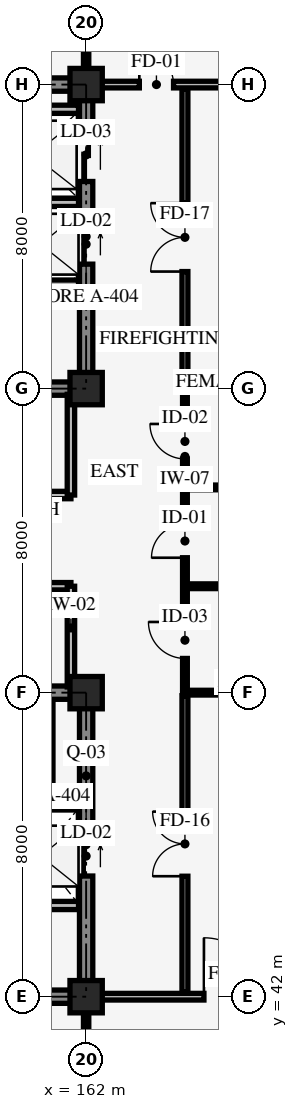
"""IFC4 building model, lengths in metres.
Left out: names, types, materials, properties, quantities, classifications, styles, units other than length and angle.
Written with IfcOpenShell. Run it as: python <this file> out.ifc"""

import sys

from ifc_helpers import new_model, si_unit, direction, frame, frame_2d, origin, origin_2d, place, context, subcontext, project, spatial, rectangle, extrude, element, fill, save


model = new_model("IFC4")
c1 = context("Model", 3, precision=1e-05, world=origin(), true_north=direction((0.0, 1.0)))
c2 = subcontext(c1, "Body", "Model", "MODEL_VIEW")
j1 = project(units=[si_unit("LENGTHUNIT", "METRE"), si_unit("PLANEANGLEUNIT", "RADIAN")], contexts=[c1])
p1 = place(None, origin())
s1 = spatial("IfcSite", under=j1, at=p1, CompositionType="ELEMENT")
p2 = place(p1, origin())
s2 = spatial("IfcBuilding", under=s1, at=p2, CompositionType="ELEMENT")
p3 = place(p2, frame((0.0, 0.0, 27.6)))
s3 = spatial("IfcBuildingStorey", under=s2, at=p3, CompositionType="ELEMENT", Elevation=27.6)
p4 = place(p3, frame((154.0, 42.0, 0.0), z_axis=(0.0, 0.0, 1.0), x_axis=(1.0, 0.0, 0.0)))
e1 = element("IfcWall", 1, at=p4, inside=s3, PredefinedType="SHEAR", context=c2, shape_type="SweptSolid", body=[
    extrude(rectangle(XDim=8.0, YDim=0.35, at=frame_2d((4.0, 0.0))), origin(), (0.0, 0.0, 1.0), 3.95),
])
p5 = place(p3, frame((162.0, 42.0, 0.0), z_axis=(0.0, 0.0, 1.0), x_axis=(0.0, 1.0, 0.0)))
e2 = element("IfcWall", 2, at=p5, inside=s3, PredefinedType="SHEAR", context=c2, shape_type="SweptSolid", body=[
    extrude(rectangle(XDim=8.0, YDim=0.35, at=frame_2d((4.0, 0.0))), origin(), (0.0, 0.0, 1.0), 3.95),
])
p6 = place(p5, frame((3.175, 0.0, 0.0)))
e3 = element("IfcOpeningElement", 3, at=p6, cuts=e2, PredefinedType="OPENING", context=c2, shape_type="SweptSolid", body=[
    extrude(rectangle(XDim=1.05, YDim=2.2, at=frame_2d((0.525, 1.1))), frame((0.0, 0.185, 0.0), z_axis=(0.0, -1.0, 0.0), x_axis=(1.0, 0.0, 0.0)), (0.0, 0.0, 1.0), 0.37),
])
p7 = place(p3, frame((162.0, 50.0, 0.0), z_axis=(0.0, 0.0, 1.0), x_axis=(-1.0, 0.0, 0.0)))
e4 = element("IfcWall", 4, at=p7, inside=s3, PredefinedType="SHEAR", context=c2, shape_type="SweptSolid", body=[
    extrude(rectangle(XDim=8.0, YDim=0.35, at=frame_2d((4.0, 0.0))), origin(), (0.0, 0.0, 1.0), 3.95),
])
p8 = place(p7, frame((5.3, 0.0, 0.0)))
e5 = element("IfcOpeningElement", 5, at=p8, cuts=e4, PredefinedType="OPENING", context=c2, shape_type="SweptSolid", body=[
    extrude(rectangle(XDim=1.3, YDim=2.15, at=frame_2d((0.65, 1.075))), frame((0.0, 0.185, 0.0), z_axis=(0.0, -1.0, 0.0), x_axis=(1.0, 0.0, 0.0)), (0.0, 0.0, 1.0), 0.37),
])
p9 = place(p7, frame((1.45, 0.0, 0.0)))
e6 = element("IfcOpeningElement", 6, at=p9, cuts=e4, PredefinedType="OPENING", context=c2, shape_type="SweptSolid", body=[
    extrude(rectangle(XDim=1.1, YDim=2.2, at=frame_2d((0.55, 1.1))), frame((0.0, 0.185, 0.0), z_axis=(0.0, -1.0, 0.0), x_axis=(1.0, 0.0, 0.0)), (0.0, 0.0, 1.0), 0.37),
])
p10 = place(p3, frame((154.0, 58.0, 0.0), z_axis=(0.0, 0.0, 1.0), x_axis=(1.0, 0.0, 0.0)))
e7 = element("IfcWall", 7, at=p10, inside=s3, PredefinedType="SHEAR", context=c2, shape_type="SweptSolid", body=[
    extrude(rectangle(XDim=8.0, YDim=0.35, at=frame_2d((4.0, 0.0))), origin(), (0.0, 0.0, 1.0), 3.95),
])
p11 = place(p10, frame((1.4, 0.0, 0.0)))
e8 = element("IfcOpeningElement", 8, at=p11, cuts=e7, PredefinedType="OPENING", context=c2, shape_type="SweptSolid", body=[
    extrude(rectangle(XDim=1.3, YDim=2.15, at=frame_2d((0.65, 1.075))), frame((0.0, 0.185, 0.0), z_axis=(0.0, -1.0, 0.0), x_axis=(1.0, 0.0, 0.0)), (0.0, 0.0, 1.0), 0.37),
])
p12 = place(p10, frame((5.3, 0.0, 0.0)))
e9 = element("IfcOpeningElement", 9, at=p12, cuts=e7, PredefinedType="OPENING", context=c2, shape_type="SweptSolid", body=[
    extrude(rectangle(XDim=1.1, YDim=2.2, at=frame_2d((0.55, 1.1))), frame((0.0, 0.185, 0.0), z_axis=(0.0, -1.0, 0.0), x_axis=(1.0, 0.0, 0.0)), (0.0, 0.0, 1.0), 0.37),
])
p13 = place(p3, frame((162.0, 58.0, 0.0), z_axis=(0.0, 0.0, 1.0), x_axis=(0.0, 1.0, 0.0)))
e10 = element("IfcWall", 10, at=p13, inside=s3, PredefinedType="SHEAR", context=c2, shape_type="SweptSolid", body=[
    extrude(rectangle(XDim=8.0, YDim=0.35, at=frame_2d((4.0, 0.0))), origin(), (0.0, 0.0, 1.0), 3.95),
])
p14 = place(p13, frame((3.275, 0.0, 0.0)))
e11 = element("IfcOpeningElement", 11, at=p14, cuts=e10, PredefinedType="OPENING", context=c2, shape_type="SweptSolid", body=[
    extrude(rectangle(XDim=1.05, YDim=2.2, at=frame_2d((0.525, 1.1))), frame((0.0, 0.185, 0.0), z_axis=(0.0, -1.0, 0.0), x_axis=(1.0, 0.0, 0.0)), (0.0, 0.0, 1.0), 0.37),
])
p15 = place(p13, frame((5.45, 0.0, 0.0)))
e12 = element("IfcOpeningElement", 12, at=p15, cuts=e10, PredefinedType="OPENING", context=c2, shape_type="SweptSolid", body=[
    extrude(rectangle(XDim=1.4, YDim=2.3, at=frame_2d((0.7, 1.15))), frame((0.0, 0.185, 0.0), z_axis=(0.0, -1.0, 0.0), x_axis=(1.0, 0.0, 0.0)), (0.0, 0.0, 1.0), 0.37),
])
p16 = place(p3, frame((162.0, 66.0, 0.0), z_axis=(0.0, 0.0, 1.0), x_axis=(-1.0, 0.0, 0.0)))
e13 = element("IfcWall", 13, at=p16, inside=s3, PredefinedType="SHEAR", context=c2, shape_type="SweptSolid", body=[
    extrude(rectangle(XDim=8.0, YDim=0.35, at=frame_2d((4.0, 0.0))), origin(), (0.0, 0.0, 1.0), 3.95),
])
for number, where, z_axis, x_axis in (
    (14, (162.0, 42.0, 0.0), (0.0, 0.0, 1.0), (1.0, 0.0, 0.0)),
    (15, (162.0, 50.0, 0.0), (0.0, 0.0, 1.0), (1.0, 0.0, 0.0)),
    (16, (162.0, 58.0, 0.0), (0.0, 0.0, 1.0), (1.0, 0.0, 0.0)),
    (17, (162.0, 66.0, 0.0), (0.0, 0.0, 1.0), (1.0, 0.0, 0.0)),
):
    element("IfcColumn", number, at=place(p3, frame(where, z_axis=z_axis, x_axis=x_axis)), inside=s3, PredefinedType="COLUMN", context=c2, shape_type="SweptSolid", body=[
        extrude(rectangle(XDim=0.85, YDim=0.85, at=origin_2d()), origin(), (0.0, 0.0, 1.0), 4.2),
    ])
p17 = place(p3, frame((158.45, 47.02, 0.0), z_axis=(0.0, 0.0, 1.0), x_axis=(1.0, 0.0, 0.0)))
e18 = element("IfcWall", 18, at=p17, inside=s3, PredefinedType="STANDARD", context=c2, shape_type="SweptSolid", body=[
    extrude(rectangle(XDim=3.35, YDim=0.215, at=frame_2d((1.675, 0.0))), origin(), (0.0, 0.0, 1.0), 3.9),
])
p18 = place(p3, frame((161.02, 47.02, 0.0), z_axis=(0.0, 0.0, 1.0), x_axis=(0.0, 1.0, 0.0)))
e19 = element("IfcWall", 19, at=p18, inside=s3, PredefinedType="STANDARD", context=c2, shape_type="SweptSolid", body=[
    extrude(rectangle(XDim=2.78, YDim=0.215, at=frame_2d((1.39, 0.0))), origin(), (0.0, 0.0, 1.0), 3.9),
])
p19 = place(p3, frame((159.78, 44.4, 0.0), z_axis=(0.0, 0.0, 1.0), x_axis=(1.0, 0.0, 0.0)))
e20 = element("IfcWall", 20, at=p19, inside=s3, PredefinedType="STANDARD", context=c2, shape_type="SweptSolid", body=[
    extrude(rectangle(XDim=2.02, YDim=0.215, at=frame_2d((1.01, 0.0))), origin(), (0.0, 0.0, 1.0), 3.9),
])
p20 = place(p3, frame((158.45, 62.9, 0.0), z_axis=(0.0, 0.0, 1.0), x_axis=(1.0, 0.0, 0.0)))
e21 = element("IfcWall", 21, at=p20, inside=s3, PredefinedType="STANDARD", context=c2, shape_type="SweptSolid", body=[
    extrude(rectangle(XDim=3.35, YDim=0.215, at=frame_2d((1.675, 0.0))), origin(), (0.0, 0.0, 1.0), 3.9),
])
p21 = place(p3, frame((159.38, 65.35, 0.0), z_axis=(0.0, 0.0, 1.0), x_axis=(1.0, 0.0, 0.0)))
e22 = element("IfcWall", 22, at=p21, inside=s3, PredefinedType="STANDARD", context=c2, shape_type="SweptSolid", body=[
    extrude(rectangle(XDim=2.42, YDim=0.215, at=frame_2d((1.21, 0.0))), origin(), (0.0, 0.0, 1.0), 3.9),
])
p22 = place(p3, frame((158.45, 60.75, 0.0), z_axis=(0.0, 0.0, 1.0), x_axis=(1.0, 0.0, 0.0)))
e23 = element("IfcWall", 23, at=p22, inside=s3, PredefinedType="STANDARD", context=c2, shape_type="SweptSolid", body=[
    extrude(rectangle(XDim=3.35, YDim=0.215, at=frame_2d((1.675, 0.0))), origin(), (0.0, 0.0, 1.0), 3.9),
])
p23 = place(p3, frame((154.0, 52.8, 0.0), z_axis=(0.0, 0.0, 1.0), x_axis=(1.0, 0.0, 0.0)))
e24 = element("IfcWall", 24, at=p23, inside=s3, PredefinedType="STANDARD", context=c2, shape_type="SweptSolid", body=[
    extrude(rectangle(XDim=7.6, YDim=0.195, at=frame_2d((3.8, 0.0))), origin(), (0.0, 0.0, 1.0), 3.9),
])
p24 = place(p23, frame((2.8, 0.0, 0.0)))
e25 = element("IfcOpeningElement", 25, at=p24, cuts=e24, PredefinedType="OPENING", context=c2, shape_type="SweptSolid", body=[
    extrude(rectangle(XDim=1.25, YDim=2.15, at=frame_2d((0.625, 1.075))), frame((0.0, 0.107, 0.0), z_axis=(0.0, -1.0, 0.0), x_axis=(1.0, 0.0, 0.0)), (0.0, 0.0, 1.0), 0.215),
])
p25 = place(p3, frame((161.6, 50.15, 0.0), z_axis=(0.0, 0.0, 1.0), x_axis=(0.0, 1.0, 0.0)))
e26 = element("IfcWall", 26, at=p25, inside=s3, PredefinedType="STANDARD", context=c2, shape_type="SweptSolid", body=[
    extrude(rectangle(XDim=2.65, YDim=0.195, at=frame_2d((1.325, 0.0))), origin(), (0.0, 0.0, 1.0), 3.29),
])
p26 = place(p3, frame((154.0, 55.2, 0.0), z_axis=(0.0, 0.0, 1.0), x_axis=(1.0, 0.0, 0.0)))
e27 = element("IfcWall", 27, at=p26, inside=s3, PredefinedType="STANDARD", context=c2, shape_type="SweptSolid", body=[
    extrude(rectangle(XDim=7.6, YDim=0.195, at=frame_2d((3.8, 0.0))), origin(), (0.0, 0.0, 1.0), 3.9),
])
p27 = place(p26, frame((2.8, 0.0, 0.0)))
e28 = element("IfcOpeningElement", 28, at=p27, cuts=e27, PredefinedType="OPENING", context=c2, shape_type="SweptSolid", body=[
    extrude(rectangle(XDim=1.35, YDim=2.15, at=frame_2d((0.675, 1.075))), frame((0.0, 0.107, 0.0), z_axis=(0.0, -1.0, 0.0), x_axis=(1.0, 0.0, 0.0)), (0.0, 0.0, 1.0), 0.215),
])
p28 = place(p3, frame((161.6, 55.2, 0.0), z_axis=(0.0, 0.0, 1.0), x_axis=(0.0, 1.0, 0.0)))
e29 = element("IfcWall", 29, at=p28, inside=s3, PredefinedType="STANDARD", context=c2, shape_type="SweptSolid", body=[
    extrude(rectangle(XDim=2.65, YDim=0.195, at=frame_2d((1.325, 0.0))), origin(), (0.0, 0.0, 1.0), 3.29),
])
p29 = place(p3, frame((164.6, 50.0, 0.0), z_axis=(0.0, 0.0, 1.0), x_axis=(0.0, 1.0, 0.0)))
e30 = element("IfcWall", 30, at=p29, inside=s3, PredefinedType="STANDARD", context=c2, shape_type="SweptSolid", body=[
    extrude(rectangle(XDim=8.0, YDim=0.125, at=frame_2d((4.0, 0.0))), origin(), (0.0, 0.0, 1.0), 3.9),
])
p30 = place(p29, frame((0.9, 0.0, 0.0)))
e31 = element("IfcOpeningElement", 31, at=p30, cuts=e30, PredefinedType="OPENING", context=c2, shape_type="SweptSolid", body=[
    extrude(rectangle(XDim=0.96, YDim=2.08, at=frame_2d((0.48, 1.04))), frame((0.0, 0.073, 0.0), z_axis=(0.0, -1.0, 0.0), x_axis=(1.0, 0.0, 0.0)), (0.0, 0.0, 1.0), 0.145),
])
p31 = place(p29, frame((3.55, 0.0, 0.0)))
e32 = element("IfcOpeningElement", 32, at=p31, cuts=e30, PredefinedType="OPENING", context=c2, shape_type="SweptSolid", body=[
    extrude(rectangle(XDim=0.88, YDim=2.05, at=frame_2d((0.44, 1.025))), frame((0.0, 0.073, 0.0), z_axis=(0.0, -1.0, 0.0), x_axis=(1.0, 0.0, 0.0)), (0.0, 0.0, 1.0), 0.145),
])
p32 = place(p29, frame((6.15, 0.0, 0.0)))
e33 = element("IfcOpeningElement", 33, at=p32, cuts=e30, PredefinedType="OPENING", context=c2, shape_type="SweptSolid", body=[
    extrude(rectangle(XDim=0.92, YDim=2.05, at=frame_2d((0.46, 1.025))), frame((0.0, 0.073, 0.0), z_axis=(0.0, -1.0, 0.0), x_axis=(1.0, 0.0, 0.0)), (0.0, 0.0, 1.0), 0.145),
])
p33 = place(p3, frame((164.6, 50.0, 0.0), z_axis=(0.0, 0.0, 1.0), x_axis=(1.0, 0.0, 0.0)))
e34 = element("IfcWall", 34, at=p33, inside=s3, PredefinedType="STANDARD", context=c2, shape_type="SweptSolid", body=[
    extrude(rectangle(XDim=3.8, YDim=0.125, at=frame_2d((1.9, 0.0))), origin(), (0.0, 0.0, 1.0), 3.24),
])
for number, where, z_axis, x_axis in (
    (35, (164.6, 52.8, 0.0), (0.0, 0.0, 1.0), (1.0, 0.0, 0.0)),
    (36, (164.6, 55.4, 0.0), (0.0, 0.0, 1.0), (1.0, 0.0, 0.0)),
):
    element("IfcWall", number, at=place(p3, frame(where, z_axis=z_axis, x_axis=x_axis)), inside=s3, PredefinedType="STANDARD", context=c2, shape_type="SweptSolid", body=[
        extrude(rectangle(XDim=3.8, YDim=0.125, at=frame_2d((1.9, 0.0))), origin(), (0.0, 0.0, 1.0), 3.9),
    ])
p34 = place(p3, frame((164.6, 58.0, 0.0), z_axis=(0.0, 0.0, 1.0), x_axis=(1.0, 0.0, 0.0)))
e37 = element("IfcWall", 37, at=p34, inside=s3, PredefinedType="STANDARD", context=c2, shape_type="SweptSolid", body=[
    extrude(rectangle(XDim=3.8, YDim=0.125, at=frame_2d((1.9, 0.0))), origin(), (0.0, 0.0, 1.0), 3.24),
])
p35 = place(p3, frame((164.6, 42.12, 0.0), z_axis=(0.0, 0.0, 1.0), x_axis=(0.0, 1.0, 0.0)))
e38 = element("IfcWall", 38, at=p35, inside=s3, PredefinedType="STANDARD", context=c2, shape_type="SweptSolid", body=[
    extrude(rectangle(XDim=7.8, YDim=0.155, at=frame_2d((3.9, 0.0))), origin(), (0.0, 0.0, 1.0), 3.9),
])
p36 = place(p35, frame((3.05, 0.0, 0.0)))
e39 = element("IfcOpeningElement", 39, at=p36, cuts=e38, PredefinedType="OPENING", context=c2, shape_type="SweptSolid", body=[
    extrude(rectangle(XDim=1.7, YDim=2.3, at=frame_2d((0.85, 1.15))), frame((0.0, 0.087, 0.0), z_axis=(0.0, -1.0, 0.0), x_axis=(1.0, 0.0, 0.0)), (0.0, 0.0, 1.0), 0.175),
])
p37 = place(p3, frame((164.6, 58.08, 0.0), z_axis=(0.0, 0.0, 1.0), x_axis=(0.0, 1.0, 0.0)))
e40 = element("IfcWall", 40, at=p37, inside=s3, PredefinedType="STANDARD", context=c2, shape_type="SweptSolid", body=[
    extrude(rectangle(XDim=7.8, YDim=0.155, at=frame_2d((3.9, 0.0))), origin(), (0.0, 0.0, 1.0), 3.9),
])
p38 = place(p37, frame((3.0, 0.0, 0.0)))
e41 = element("IfcOpeningElement", 41, at=p38, cuts=e40, PredefinedType="OPENING", context=c2, shape_type="SweptSolid", body=[
    extrude(rectangle(XDim=1.8, YDim=2.3, at=frame_2d((0.9, 1.15))), frame((0.0, 0.087, 0.0), z_axis=(0.0, -1.0, 0.0), x_axis=(1.0, 0.0, 0.0)), (0.0, 0.0, 1.0), 0.175),
])
p39 = place(p3, frame((162.0, 34.05, 0.0), z_axis=(0.0, 0.0, 1.0), x_axis=(0.0, 1.0, 0.0)))
e42 = element("IfcWall", 42, at=p39, inside=s3, PredefinedType="STANDARD", context=c2, shape_type="SweptSolid", body=[
    extrude(rectangle(XDim=7.83, YDim=0.14, at=frame_2d((3.915, 0.0))), origin(), (0.0, 0.0, 1.0), 3.29),
])
p40 = place(p39, frame((3.0, 0.0, 0.0)))
e43 = element("IfcOpeningElement", 43, at=p40, cuts=e42, PredefinedType="OPENING", context=c2, shape_type="SweptSolid", body=[
    extrude(rectangle(XDim=1.06, YDim=2.12, at=frame_2d((0.53, 1.06))), frame((0.0, 0.08, 0.0), z_axis=(0.0, -1.0, 0.0), x_axis=(1.0, 0.0, 0.0)), (0.0, 0.0, 1.0), 0.16),
])
p41 = place(p3, frame((162.35, 42.0, 0.0), z_axis=(0.0, 0.0, 1.0), x_axis=(1.0, 0.0, 0.0)))
e44 = element("IfcWall", 44, at=p41, inside=s3, PredefinedType="STANDARD", context=c2, shape_type="SweptSolid", body=[
    extrude(rectangle(XDim=14.7, YDim=0.175, at=frame_2d((7.35, 0.0))), origin(), (0.0, 0.0, 1.0), 3.24),
])
p42 = place(p41, frame((2.75, 0.0, 0.0)))
e45 = element("IfcOpeningElement", 45, at=p42, cuts=e44, PredefinedType="OPENING", context=c2, shape_type="SweptSolid", body=[
    extrude(rectangle(XDim=1.55, YDim=2.25, at=frame_2d((0.775, 1.125))), frame((0.0, 0.098, 0.0), z_axis=(0.0, -1.0, 0.0), x_axis=(1.0, 0.0, 0.0)), (0.0, 0.0, 1.0), 0.195),
])
p43 = place(p3, frame((162.0, 66.12, 0.0), z_axis=(0.0, 0.0, 1.0), x_axis=(0.0, 1.0, 0.0)))
e46 = element("IfcWall", 46, at=p43, inside=s3, PredefinedType="STANDARD", context=c2, shape_type="SweptSolid", body=[
    extrude(rectangle(XDim=7.83, YDim=0.14, at=frame_2d((3.915, 0.0))), origin(), (0.0, 0.0, 1.0), 3.29),
])
p44 = place(p43, frame((3.0, 0.0, 0.0)))
e47 = element("IfcOpeningElement", 47, at=p44, cuts=e46, PredefinedType="OPENING", context=c2, shape_type="SweptSolid", body=[
    extrude(rectangle(XDim=1.12, YDim=2.12, at=frame_2d((0.56, 1.06))), frame((0.0, 0.08, 0.0), z_axis=(0.0, -1.0, 0.0), x_axis=(1.0, 0.0, 0.0)), (0.0, 0.0, 1.0), 0.16),
])
p45 = place(p3, frame((162.35, 66.0, 0.0), z_axis=(0.0, 0.0, 1.0), x_axis=(1.0, 0.0, 0.0)))
e48 = element("IfcWall", 48, at=p45, inside=s3, PredefinedType="STANDARD", context=c2, shape_type="SweptSolid", body=[
    extrude(rectangle(XDim=14.7, YDim=0.175, at=frame_2d((7.35, 0.0))), origin(), (0.0, 0.0, 1.0), 3.24),
])
p46 = place(p45, frame((1.05, 0.0, 0.0)))
e49 = element("IfcOpeningElement", 49, at=p46, cuts=e48, PredefinedType="OPENING", context=c2, shape_type="SweptSolid", body=[
    extrude(rectangle(XDim=0.9, YDim=2.1, at=frame_2d((0.45, 1.05))), frame((0.0, 0.098, 0.0), z_axis=(0.0, -1.0, 0.0), x_axis=(1.0, 0.0, 0.0)), (0.0, 0.0, 1.0), 0.195),
])
p47 = place(p6, origin())
e50 = element("IfcDoor", 50, at=p47, inside=s3, OperationType="SLIDING_TO_LEFT", PredefinedType="DOOR", context=c2, shape_type="SweptSolid", body=[
    extrude(rectangle(XDim=1.05, YDim=2.2, at=frame_2d((0.525, 1.1))), frame((0.0, 0.025, 0.0), z_axis=(0.0, -1.0, 0.0), x_axis=(1.0, 0.0, 0.0)), (0.0, 0.0, 1.0), 0.05),
])
fill(e3, e50)
p48 = place(p14, origin())
e51 = element("IfcDoor", 51, at=p48, inside=s3, OperationType="SLIDING_TO_RIGHT", PredefinedType="DOOR", context=c2, shape_type="SweptSolid", body=[
    extrude(rectangle(XDim=1.05, YDim=2.2, at=frame_2d((0.525, 1.1))), frame((0.0, 0.025, 0.0), z_axis=(0.0, -1.0, 0.0), x_axis=(1.0, 0.0, 0.0)), (0.0, 0.0, 1.0), 0.05),
])
fill(e11, e51)
p49 = place(p15, origin())
e52 = element("IfcDoor", 52, at=p49, inside=s3, OperationType="DOUBLE_DOOR_SLIDING", PredefinedType="DOOR", context=c2, shape_type="SweptSolid", body=[
    extrude(rectangle(XDim=1.4, YDim=2.3, at=frame_2d((0.7, 1.15))), frame((0.0, 0.025, 0.0), z_axis=(0.0, -1.0, 0.0), x_axis=(1.0, 0.0, 0.0)), (0.0, 0.0, 1.0), 0.05),
])
fill(e12, e52)
p50 = place(p30, origin())
e53 = element("IfcDoor", 53, at=p50, inside=s3, OperationType="SINGLE_SWING_RIGHT", PredefinedType="DOOR", context=c2, shape_type="SweptSolid", body=[
    extrude(rectangle(XDim=0.96, YDim=2.08, at=frame_2d((0.48, 1.04))), frame((0.0, 0.025, 0.0), z_axis=(0.0, -1.0, 0.0), x_axis=(1.0, 0.0, 0.0)), (0.0, 0.0, 1.0), 0.05),
])
fill(e31, e53)
p51 = place(p31, origin())
e54 = element("IfcDoor", 54, at=p51, inside=s3, OperationType="SINGLE_SWING_LEFT", PredefinedType="DOOR", context=c2, shape_type="SweptSolid", body=[
    extrude(rectangle(XDim=0.88, YDim=2.05, at=frame_2d((0.44, 1.025))), frame((0.0, 0.025, 0.0), z_axis=(0.0, -1.0, 0.0), x_axis=(1.0, 0.0, 0.0)), (0.0, 0.0, 1.0), 0.05),
])
fill(e32, e54)
p52 = place(p32, origin())
e55 = element("IfcDoor", 55, at=p52, inside=s3, OperationType="SINGLE_SWING_RIGHT", PredefinedType="DOOR", context=c2, shape_type="SweptSolid", body=[
    extrude(rectangle(XDim=0.92, YDim=2.05, at=frame_2d((0.46, 1.025))), frame((0.0, 0.025, 0.0), z_axis=(0.0, -1.0, 0.0), x_axis=(1.0, 0.0, 0.0)), (0.0, 0.0, 1.0), 0.05),
])
fill(e33, e55)
p53 = place(p36, origin())
e56 = element("IfcDoor", 56, at=p53, inside=s3, OperationType="DOUBLE_DOOR_SINGLE_SWING", PredefinedType="DOOR", context=c2, shape_type="SweptSolid", body=[
    extrude(rectangle(XDim=1.7, YDim=2.3, at=frame_2d((0.85, 1.15))), frame((0.0, 0.025, 0.0), z_axis=(0.0, -1.0, 0.0), x_axis=(1.0, 0.0, 0.0)), (0.0, 0.0, 1.0), 0.05),
])
fill(e39, e56)
p54 = place(p38, origin())
e57 = element("IfcDoor", 57, at=p54, inside=s3, OperationType="DOUBLE_DOOR_SINGLE_SWING", PredefinedType="DOOR", context=c2, shape_type="SweptSolid", body=[
    extrude(rectangle(XDim=1.8, YDim=2.3, at=frame_2d((0.9, 1.15))), frame((0.0, 0.025, 0.0), z_axis=(0.0, -1.0, 0.0), x_axis=(1.0, 0.0, 0.0)), (0.0, 0.0, 1.0), 0.05),
])
fill(e41, e57)
p55 = place(p42, origin())
e58 = element("IfcDoor", 58, at=p55, inside=s3, OperationType="SINGLE_SWING_LEFT", PredefinedType="DOOR", context=c2, shape_type="SweptSolid", body=[
    extrude(rectangle(XDim=1.55, YDim=2.25, at=frame_2d((0.775, 1.125))), frame((0.0, 0.025, 0.0), z_axis=(0.0, -1.0, 0.0), x_axis=(1.0, 0.0, 0.0)), (0.0, 0.0, 1.0), 0.05),
])
fill(e45, e58)
p56 = place(p46, origin())
e59 = element("IfcDoor", 59, at=p56, inside=s3, OperationType="SINGLE_SWING_LEFT", PredefinedType="DOOR", context=c2, shape_type="SweptSolid", body=[
    extrude(rectangle(XDim=0.9, YDim=2.1, at=frame_2d((0.45, 1.05))), frame((0.0, 0.025, 0.0), z_axis=(0.0, -1.0, 0.0), x_axis=(1.0, 0.0, 0.0)), (0.0, 0.0, 1.0), 0.05),
])
fill(e49, e59)
save(model, sys.argv[1])
